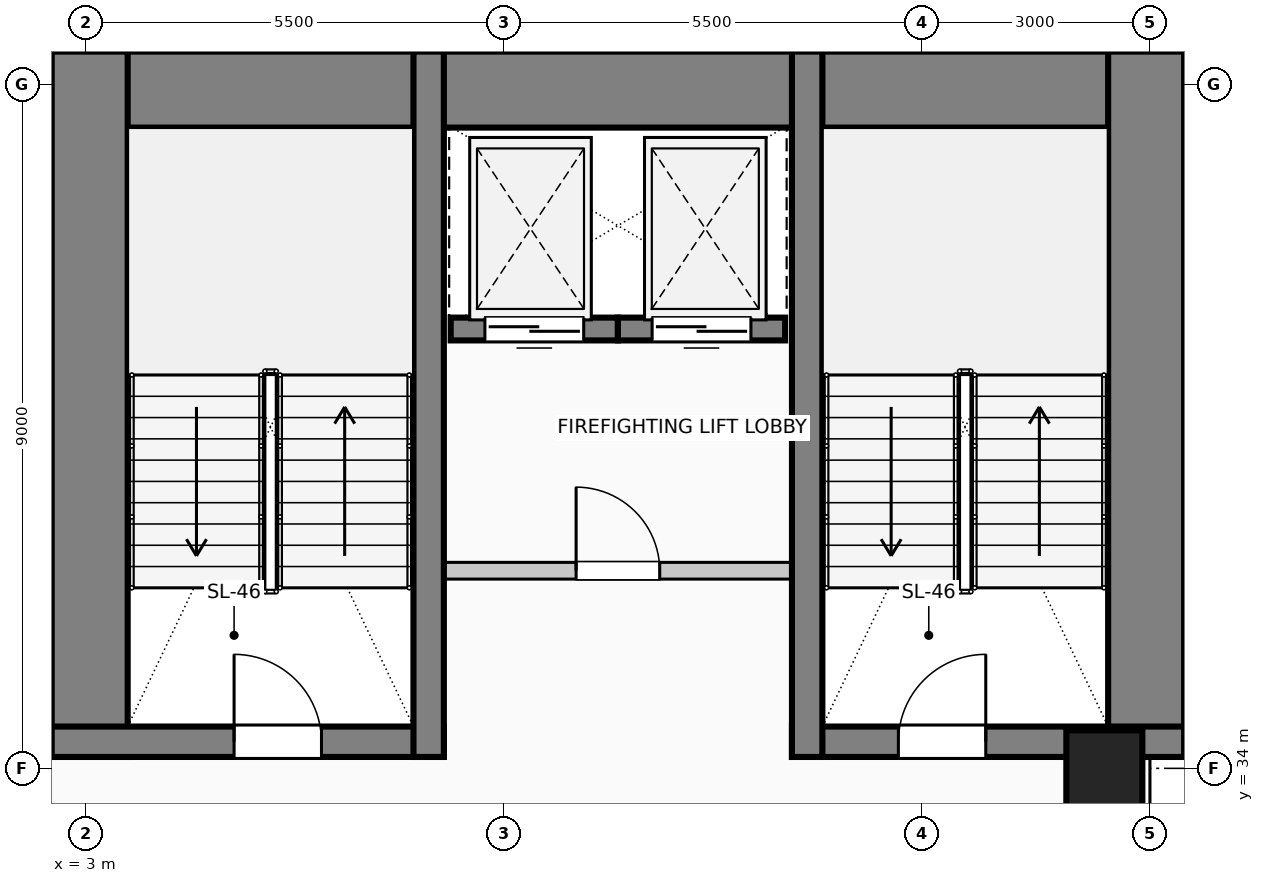
"""IFC4 building model, lengths in metres.
Left out: names, types, materials, properties, quantities, classifications, styles, units other than length and angle.
Written with IfcOpenShell. Run it as: python <this file> out.ifc"""

import sys

from ifc_helpers import new_model, si_unit, direction, frame, frame_2d, origin, origin_2d, place, context, subcontext, project, spatial, rectangle, circle, extrude, element, fill, save


model = new_model("IFC4")
c1 = context("Model", 3, precision=1e-05, world=origin(), true_north=direction((0.0, 1.0)))
c2 = subcontext(c1, "Body", "Model", "MODEL_VIEW")
j1 = project(units=[si_unit("LENGTHUNIT", "METRE"), si_unit("PLANEANGLEUNIT", "RADIAN")], contexts=[c1])
p1 = place(None, origin())
s1 = spatial("IfcSite", under=j1, at=p1, CompositionType="ELEMENT")
p2 = place(p1, origin())
s2 = spatial("IfcBuilding", under=s1, at=p2, CompositionType="ELEMENT")
p3 = place(p2, frame((0.0, 0.0, 26.6)))
s3 = spatial("IfcBuildingStorey", under=s2, at=p3, CompositionType="ELEMENT", Elevation=26.6)
p4 = place(p3, frame((2.55, 42.93, 0.0), z_axis=(0.0, 0.0, 1.0), x_axis=(1.0, 0.0, 0.0)))
e1 = element("IfcWall", 1, at=p4, inside=s3, PredefinedType="SHEAR", context=c2, shape_type="SweptSolid", body=[
    extrude(rectangle(XDim=14.9, YDim=1.0, at=frame_2d((7.45, 0.0))), origin(), (0.0, 0.0, 1.0), 4.0),
])
for number, where, z_axis, x_axis in (
    (2, (3.05, 34.15, 0.0), (0.0, 0.0, 1.0), (0.0, 1.0, 0.0)),
    (3, (16.95, 34.15, 0.0), (0.0, 0.0, 1.0), (0.0, 1.0, 0.0)),
):
    element("IfcWall", number, at=place(p3, frame(where, z_axis=z_axis, x_axis=x_axis)), inside=s3, PredefinedType="SHEAR", context=c2, shape_type="SweptSolid", body=[
        extrude(rectangle(XDim=9.28, YDim=1.0, at=frame_2d((4.64, 0.0))), origin(), (0.0, 0.0, 1.0), 4.0),
    ])
p5 = place(p3, frame((2.55, 34.35, 0.0), z_axis=(0.0, 0.0, 1.0), x_axis=(1.0, 0.0, 0.0)))
e4 = element("IfcWall", 4, at=p5, inside=s3, PredefinedType="SHEAR", context=c2, shape_type="SweptSolid", body=[
    extrude(rectangle(XDim=5.16, YDim=0.4, at=frame_2d((2.58, 0.0))), origin(), (0.0, 0.0, 1.0), 4.0),
])
p6 = place(p5, frame((2.4, 0.0, 0.0)))
e5 = element("IfcOpeningElement", 5, at=p6, cuts=e4, PredefinedType="OPENING", context=c2, shape_type="SweptSolid", body=[
    extrude(rectangle(XDim=1.15, YDim=2.2, at=frame_2d((0.575, 1.1))), frame((0.0, 0.21, 0.0), z_axis=(0.0, -1.0, 0.0), x_axis=(1.0, 0.0, 0.0)), (0.0, 0.0, 1.0), 0.42),
])
p7 = place(p3, frame((12.29, 34.35, 0.0), z_axis=(0.0, 0.0, 1.0), x_axis=(1.0, 0.0, 0.0)))
e6 = element("IfcWall", 6, at=p7, inside=s3, PredefinedType="SHEAR", context=c2, shape_type="SweptSolid", body=[
    extrude(rectangle(XDim=5.16, YDim=0.4, at=frame_2d((2.58, 0.0))), origin(), (0.0, 0.0, 1.0), 4.0),
])
p8 = place(p7, frame((1.4, 0.0, 0.0)))
e7 = element("IfcOpeningElement", 7, at=p8, cuts=e6, PredefinedType="OPENING", context=c2, shape_type="SweptSolid", body=[
    extrude(rectangle(XDim=1.15, YDim=2.2, at=frame_2d((0.575, 1.1))), frame((0.0, 0.21, 0.0), z_axis=(0.0, -1.0, 0.0), x_axis=(1.0, 0.0, 0.0)), (0.0, 0.0, 1.0), 0.42),
])
for number, where, z_axis, x_axis in (
    (8, (7.51, 34.15, 0.0), (0.0, 0.0, 1.0), (0.0, 1.0, 0.0)),
    (9, (12.49, 34.15, 0.0), (0.0, 0.0, 1.0), (0.0, 1.0, 0.0)),
):
    element("IfcWall", number, at=place(p3, frame(where, z_axis=z_axis, x_axis=x_axis)), inside=s3, PredefinedType="SHEAR", context=c2, shape_type="SweptSolid", body=[
        extrude(rectangle(XDim=9.28, YDim=0.4, at=frame_2d((4.64, 0.0))), origin(), (0.0, 0.0, 1.0), 4.0),
    ])
p9 = place(p3, frame((16.4, 34.0, 0.0), z_axis=(0.0, 0.0, 1.0), x_axis=(1.0, 0.0, 0.0)))
e10 = element("IfcColumn", 10, at=p9, inside=s3, PredefinedType="COLUMN", context=c2, shape_type="SweptSolid", body=[
    extrude(circle(Radius=0.5, at=origin_2d()), origin(), (0.0, 0.0, 1.0), 4.0),
])
p10 = place(p3, frame((10.0, 39.78, 0.0), z_axis=(0.0, 0.0, 1.0), x_axis=(-1.0, 0.0, 0.0)))
e11 = element("IfcWall", 11, at=p10, inside=s3, PredefinedType="SOLIDWALL", context=c2, shape_type="SweptSolid", body=[
    extrude(rectangle(XDim=2.2, YDim=0.3, at=frame_2d((1.1, 0.0))), origin(), (0.0, 0.0, 1.0), 4.0),
])
p11 = place(p10, frame((0.45, 0.0, 0.0)))
e12 = element("IfcOpeningElement", 12, at=p11, cuts=e11, PredefinedType="OPENING", context=c2, shape_type="SweptSolid", body=[
    extrude(rectangle(XDim=1.3, YDim=2.25, at=frame_2d((0.65, 1.125))), frame((0.0, 0.16, 0.0), z_axis=(0.0, -1.0, 0.0), x_axis=(1.0, 0.0, 0.0)), (0.0, 0.0, 1.0), 0.32),
])
p12 = place(p3, frame((12.2, 39.78, 0.0), z_axis=(0.0, 0.0, 1.0), x_axis=(-1.0, 0.0, 0.0)))
e13 = element("IfcWall", 13, at=p12, inside=s3, PredefinedType="SOLIDWALL", context=c2, shape_type="SweptSolid", body=[
    extrude(rectangle(XDim=2.2, YDim=0.3, at=frame_2d((1.1, 0.0))), origin(), (0.0, 0.0, 1.0), 4.0),
])
p13 = place(p12, frame((0.45, 0.0, 0.0)))
e14 = element("IfcOpeningElement", 14, at=p13, cuts=e13, PredefinedType="OPENING", context=c2, shape_type="SweptSolid", body=[
    extrude(rectangle(XDim=1.3, YDim=2.25, at=frame_2d((0.65, 1.125))), frame((0.0, 0.16, 0.0), z_axis=(0.0, -1.0, 0.0), x_axis=(1.0, 0.0, 0.0)), (0.0, 0.0, 1.0), 0.32),
])
p14 = place(p3, frame((7.51, 36.6, 0.0), z_axis=(0.0, 0.0, 1.0), x_axis=(1.0, 0.0, 0.0)))
e15 = element("IfcWall", 15, at=p14, inside=s3, PredefinedType="PARTITIONING", context=c2, shape_type="SweptSolid", body=[
    extrude(rectangle(XDim=4.98, YDim=0.22, at=frame_2d((2.49, 0.0))), origin(), (0.0, 0.0, 1.0), 3.7),
])
p15 = place(p14, frame((1.94, 0.0, 0.0)))
e16 = element("IfcOpeningElement", 16, at=p15, cuts=e15, PredefinedType="OPENING", context=c2, shape_type="SweptSolid", body=[
    extrude(rectangle(XDim=1.1, YDim=2.2, at=frame_2d((0.55, 1.1))), frame((0.0, 0.12, 0.0), z_axis=(0.0, -1.0, 0.0), x_axis=(1.0, 0.0, 0.0)), (0.0, 0.0, 1.0), 0.24),
])
p16 = place(p11, origin())
e17 = element("IfcDoor", 17, at=p16, inside=s3, OperationType="SLIDING_TO_LEFT", PredefinedType="DOOR", context=c2, shape_type="SweptSolid", body=[
    extrude(rectangle(XDim=1.3, YDim=2.25, at=frame_2d((0.65, 1.125))), frame((0.0, 0.025, 0.0), z_axis=(0.0, -1.0, 0.0), x_axis=(1.0, 0.0, 0.0)), (0.0, 0.0, 1.0), 0.05),
])
fill(e12, e17)
p17 = place(p13, origin())
e18 = element("IfcDoor", 18, at=p17, inside=s3, OperationType="SLIDING_TO_RIGHT", PredefinedType="DOOR", context=c2, shape_type="SweptSolid", body=[
    extrude(rectangle(XDim=1.3, YDim=2.25, at=frame_2d((0.65, 1.125))), frame((0.0, 0.025, 0.0), z_axis=(0.0, -1.0, 0.0), x_axis=(1.0, 0.0, 0.0)), (0.0, 0.0, 1.0), 0.05),
])
fill(e14, e18)
p18 = place(p6, origin())
e19 = element("IfcDoor", 19, at=p18, inside=s3, OperationType="SINGLE_SWING_LEFT", PredefinedType="DOOR", context=c2, shape_type="SweptSolid", body=[
    extrude(rectangle(XDim=1.15, YDim=2.2, at=frame_2d((0.575, 1.1))), frame((0.0, 0.025, 0.0), z_axis=(0.0, -1.0, 0.0), x_axis=(1.0, 0.0, 0.0)), (0.0, 0.0, 1.0), 0.05),
])
fill(e5, e19)
p19 = place(p8, origin())
e20 = element("IfcDoor", 20, at=p19, inside=s3, OperationType="SINGLE_SWING_RIGHT", PredefinedType="DOOR", context=c2, shape_type="SweptSolid", body=[
    extrude(rectangle(XDim=1.15, YDim=2.2, at=frame_2d((0.575, 1.1))), frame((0.0, 0.025, 0.0), z_axis=(0.0, -1.0, 0.0), x_axis=(1.0, 0.0, 0.0)), (0.0, 0.0, 1.0), 0.05),
])
fill(e7, e20)
p20 = place(p15, origin())
e21 = element("IfcDoor", 21, at=p20, inside=s3, OperationType="SINGLE_SWING_LEFT", PredefinedType="DOOR", context=c2, shape_type="SweptSolid", body=[
    extrude(rectangle(XDim=1.1, YDim=2.2, at=frame_2d((0.55, 1.1))), frame((0.0, 0.025, 0.0), z_axis=(0.0, -1.0, 0.0), x_axis=(1.0, 0.0, 0.0)), (0.0, 0.0, 1.0), 0.05),
])
fill(e16, e21)
save(model, sys.argv[1])
